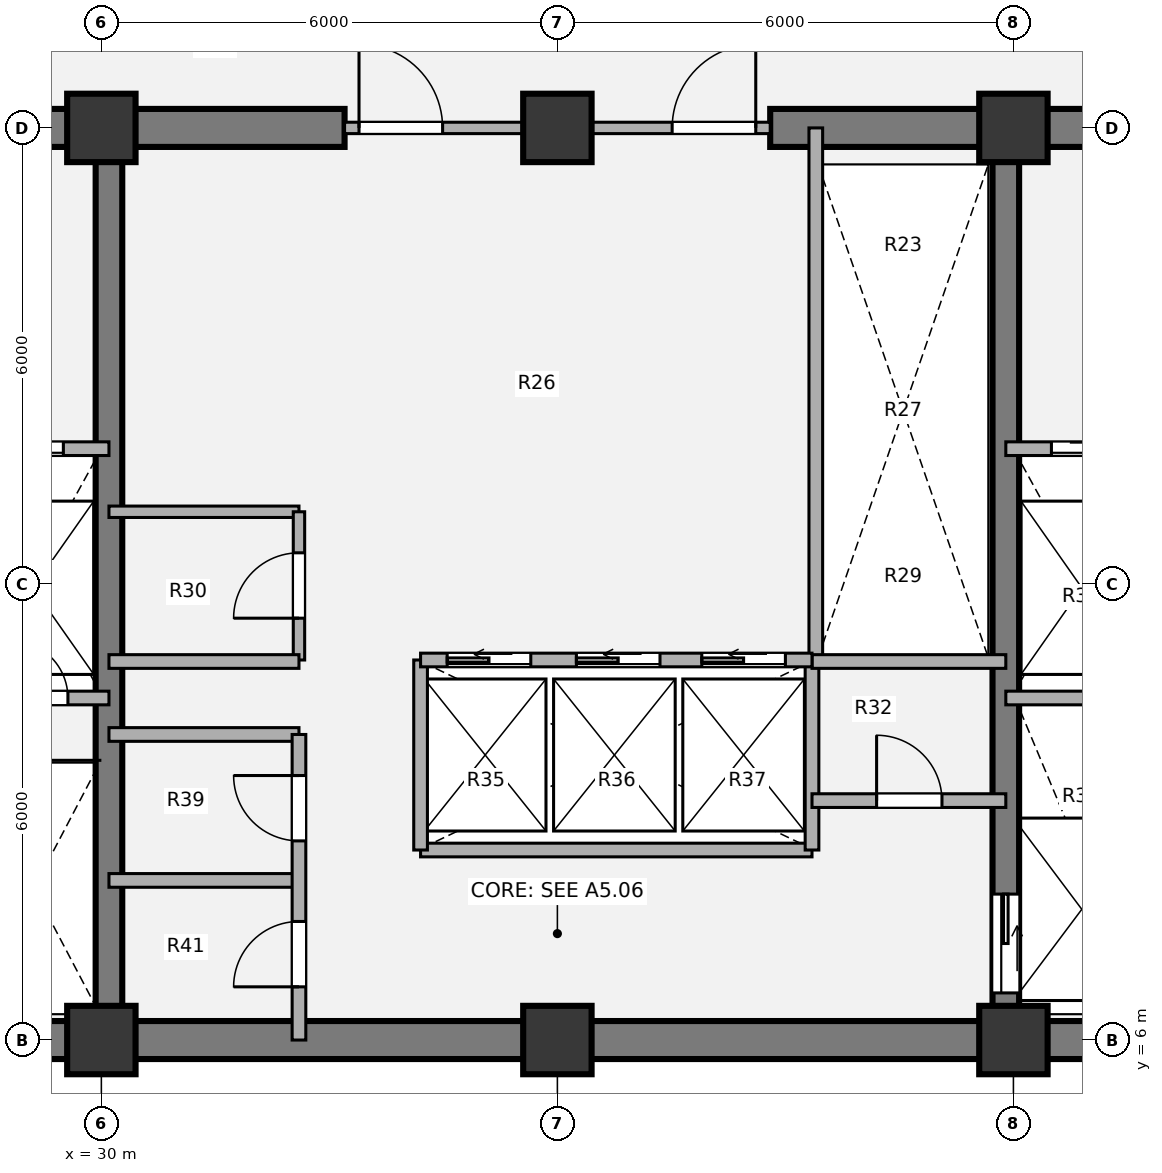
"""IFC4 building model, lengths in metres.
Left out: names, types, materials, properties, quantities, classifications, styles, units other than length and angle.
Written with IfcOpenShell. Run it as: python <this file> out.ifc"""

import sys

from ifc_helpers import new_model, si_unit, direction, frame, frame_2d, origin, origin_2d, place, context, subcontext, project, spatial, rectangle, extrude, source, transform, mapped, element, fill, save


model = new_model("IFC4")
c1 = context("Model", 3, precision=1e-05, world=origin(), true_north=direction((0.0, 1.0)))
c2 = subcontext(c1, "Body", "Model", "MODEL_VIEW")
j1 = project(units=[si_unit("LENGTHUNIT", "METRE"), si_unit("PLANEANGLEUNIT", "RADIAN")], contexts=[c1])
p1 = place(None, origin())
s1 = spatial("IfcSite", under=j1, at=p1, CompositionType="ELEMENT")
p2 = place(p1, origin())
s2 = spatial("IfcBuilding", under=s1, at=p2, CompositionType="ELEMENT")
p3 = place(p2, frame((0.0, 0.0, 93.6)))
s3 = spatial("IfcBuildingStorey", under=s2, at=p3, CompositionType="ELEMENT", Elevation=93.6)
m1 = source(origin(), c2, "Body", "SweptSolid", [
    extrude(rectangle(XDim=0.9, YDim=0.9, at=origin_2d()), origin(), (0.0, 0.0, 1.0), 3.78),
])
for number, where, z_axis, x_axis in (
    (1, (30.0, 6.0, 0.0), (0.0, 0.0, 1.0), (1.0, 0.0, 0.0)),
    (2, (36.0, 6.0, 0.0), (0.0, 0.0, 1.0), (1.0, 0.0, 0.0)),
    (3, (42.0, 6.0, 0.0), (0.0, 0.0, 1.0), (1.0, 0.0, 0.0)),
    (4, (30.0, 18.0, 0.0), (0.0, 0.0, 1.0), (1.0, 0.0, 0.0)),
    (5, (36.0, 18.0, 0.0), (0.0, 0.0, 1.0), (1.0, 0.0, 0.0)),
    (6, (42.0, 18.0, 0.0), (0.0, 0.0, 1.0), (1.0, 0.0, 0.0)),
):
    element("IfcColumn", number, at=place(p3, frame(where, z_axis=z_axis, x_axis=x_axis)), inside=s3, PredefinedType="COLUMN", context=c2, shape_type="MappedRepresentation", body=[
        mapped(m1, transform((0.0, 0.0, 0.0), x_axis=(1.0, 0.0, 0.0), y_axis=(0.0, 1.0, 0.0), z_axis=(0.0, 0.0, 1.0), scale=1.0)),
    ])
p4 = place(p3, frame((48.25, 6.0, 0.0), z_axis=(0.0, 0.0, 1.0), x_axis=(-1.0, 0.0, 0.0)))
e7 = element("IfcWall", 7, at=p4, inside=s3, PredefinedType="SHEAR", context=c2, shape_type="SweptSolid", body=[
    extrude(rectangle(XDim=24.5, YDim=0.5, at=frame_2d((12.25, 0.0))), origin(), (0.0, 0.0, 1.0), 3.78),
])
p5 = place(p3, frame((23.75, 18.0, 0.0), z_axis=(0.0, 0.0, 1.0), x_axis=(1.0, 0.0, 0.0)))
e8 = element("IfcWall", 8, at=p5, inside=s3, PredefinedType="SHEAR", context=c2, shape_type="SweptSolid", body=[
    extrude(rectangle(XDim=9.45, YDim=0.5, at=frame_2d((4.725, 0.0))), origin(), (0.0, 0.0, 1.0), 3.78),
])
p6 = place(p5, frame((2.95, 0.0, 0.0)))
e9 = element("IfcOpeningElement", 9, at=p6, cuts=e8, PredefinedType="OPENING", context=c2, shape_type="SweptSolid", body=[
    extrude(rectangle(XDim=1.1, YDim=2.1, at=origin_2d()), frame((0.55, 0.26, 1.05), z_axis=(0.0, -1.0, 0.0), x_axis=(1.0, 0.0, 0.0)), (0.0, 0.0, 1.0), 0.52),
])
p7 = place(p3, frame((38.8, 18.0, 0.0), z_axis=(0.0, 0.0, 1.0), x_axis=(1.0, 0.0, 0.0)))
e10 = element("IfcWall", 10, at=p7, inside=s3, PredefinedType="SHEAR", context=c2, shape_type="SweptSolid", body=[
    extrude(rectangle(XDim=9.45, YDim=0.5, at=frame_2d((4.725, 0.0))), origin(), (0.0, 0.0, 1.0), 3.78),
])
p8 = place(p7, frame((5.45, 0.0, 0.0)))
e11 = element("IfcOpeningElement", 11, at=p8, cuts=e10, PredefinedType="OPENING", context=c2, shape_type="SweptSolid", body=[
    extrude(rectangle(XDim=1.1, YDim=2.1, at=origin_2d()), frame((0.55, 0.26, 1.05), z_axis=(0.0, -1.0, 0.0), x_axis=(1.0, 0.0, 0.0)), (0.0, 0.0, 1.0), 0.52),
])
p9 = place(p3, frame((30.1, 6.0, 0.0), z_axis=(0.0, 0.0, 1.0), x_axis=(0.0, 1.0, 0.0)))
e12 = element("IfcWall", 12, at=p9, inside=s3, PredefinedType="SHEAR", context=c2, shape_type="SweptSolid", body=[
    extrude(rectangle(XDim=12.0, YDim=0.35, at=frame_2d((6.0, 0.0))), origin(), (0.0, 0.0, 1.0), 3.78),
])
p10 = place(p3, frame((41.9, 18.0, 0.0), z_axis=(0.0, 0.0, 1.0), x_axis=(0.0, -1.0, 0.0)))
e13 = element("IfcWall", 13, at=p10, inside=s3, PredefinedType="SHEAR", context=c2, shape_type="SweptSolid", body=[
    extrude(rectangle(XDim=12.0, YDim=0.35, at=frame_2d((6.0, 0.0))), origin(), (0.0, 0.0, 1.0), 3.78),
])
p11 = place(p10, frame((10.08, 0.0, 0.0)))
e14 = element("IfcOpeningElement", 14, at=p11, cuts=e13, PredefinedType="OPENING", context=c2, shape_type="SweptSolid", body=[
    extrude(rectangle(XDim=1.3, YDim=2.1, at=origin_2d()), frame((0.65, 0.185, 1.05), z_axis=(0.0, -1.0, 0.0), x_axis=(1.0, 0.0, 0.0)), (0.0, 0.0, 1.0), 0.37),
])
p12 = place(p3, frame((30.1, 12.95, 0.0), z_axis=(0.0, 0.0, 1.0), x_axis=(1.0, 0.0, 0.0)))
e15 = element("IfcWall", 15, at=p12, inside=s3, PredefinedType="PARTITIONING", context=c2, shape_type="SweptSolid", body=[
    extrude(rectangle(XDim=2.5, YDim=0.15, at=frame_2d((1.25, 0.0))), origin(), (0.0, 0.0, 1.0), 3.5),
])
p13 = place(p3, frame((32.6, 11.0, 0.0), z_axis=(0.0, 0.0, 1.0), x_axis=(0.0, 1.0, 0.0)))
e16 = element("IfcWall", 16, at=p13, inside=s3, PredefinedType="PARTITIONING", context=c2, shape_type="SweptSolid", body=[
    extrude(rectangle(XDim=1.95, YDim=0.15, at=frame_2d((0.975, 0.0))), origin(), (0.0, 0.0, 1.0), 3.5),
])
p14 = place(p13, frame((0.55, 0.0, 0.0)))
e17 = element("IfcOpeningElement", 17, at=p14, cuts=e16, PredefinedType="OPENING", context=c2, shape_type="SweptSolid", body=[
    extrude(rectangle(XDim=0.86, YDim=2.1, at=origin_2d()), frame((0.43, 0.085, 1.05), z_axis=(0.0, -1.0, 0.0), x_axis=(1.0, 0.0, 0.0)), (0.0, 0.0, 1.0), 0.17),
])
p15 = place(p3, frame((34.2, 8.5, 0.0), z_axis=(0.0, 0.0, 1.0), x_axis=(1.0, 0.0, 0.0)))
e18 = element("IfcWall", 18, at=p15, inside=s3, PredefinedType="PARTITIONING", context=c2, shape_type="SweptSolid", body=[
    extrude(rectangle(XDim=5.15, YDim=0.18, at=frame_2d((2.575, 0.0))), origin(), (0.0, 0.0, 1.0), 3.5),
])
for number, where, z_axis, x_axis in (
    (19, (34.2, 8.5, 0.0), (0.0, 0.0, 1.0), (0.0, 1.0, 0.0)),
    (20, (39.35, 8.5, 0.0), (0.0, 0.0, 1.0), (0.0, 1.0, 0.0)),
):
    element("IfcWall", number, at=place(p3, frame(where, z_axis=z_axis, x_axis=x_axis)), inside=s3, PredefinedType="PARTITIONING", context=c2, shape_type="SweptSolid", body=[
        extrude(rectangle(XDim=2.5, YDim=0.18, at=frame_2d((1.25, 0.0))), origin(), (0.0, 0.0, 1.0), 3.5),
    ])
p16 = place(p3, frame((39.4, 11.0, 0.0), z_axis=(0.0, 0.0, 1.0), x_axis=(0.0, 1.0, 0.0)))
e21 = element("IfcWall", 21, at=p16, inside=s3, PredefinedType="PARTITIONING", context=c2, shape_type="SweptSolid", body=[
    extrude(rectangle(XDim=7.0, YDim=0.18, at=frame_2d((3.5, 0.0))), origin(), (0.0, 0.0, 1.0), 3.5),
])
p17 = place(p3, frame((30.1, 10.98, 0.0), z_axis=(0.0, 0.0, 1.0), x_axis=(1.0, 0.0, 0.0)))
e22 = element("IfcWall", 22, at=p17, inside=s3, PredefinedType="PARTITIONING", context=c2, shape_type="SweptSolid", body=[
    extrude(rectangle(XDim=2.5, YDim=0.18, at=frame_2d((1.25, 0.0))), origin(), (0.0, 0.0, 1.0), 3.5),
])
p18 = place(p3, frame((39.35, 10.98, 0.0), z_axis=(0.0, 0.0, 1.0), x_axis=(1.0, 0.0, 0.0)))
e23 = element("IfcWall", 23, at=p18, inside=s3, PredefinedType="PARTITIONING", context=c2, shape_type="SweptSolid", body=[
    extrude(rectangle(XDim=2.55, YDim=0.18, at=frame_2d((1.275, 0.0))), origin(), (0.0, 0.0, 1.0), 3.5),
])
for number, where, z_axis, x_axis in (
    (24, (30.1, 8.1, 0.0), (0.0, 0.0, 1.0), (1.0, 0.0, 0.0)),
    (25, (30.1, 10.02, 0.0), (0.0, 0.0, 1.0), (1.0, 0.0, 0.0)),
):
    element("IfcWall", number, at=place(p3, frame(where, z_axis=z_axis, x_axis=x_axis)), inside=s3, PredefinedType="PARTITIONING", context=c2, shape_type="SweptSolid", body=[
        extrude(rectangle(XDim=2.5, YDim=0.18, at=frame_2d((1.25, 0.0))), origin(), (0.0, 0.0, 1.0), 3.5),
    ])
p19 = place(p3, frame((32.6, 6.0, 0.0), z_axis=(0.0, 0.0, 1.0), x_axis=(0.0, 1.0, 0.0)))
e26 = element("IfcWall", 26, at=p19, inside=s3, PredefinedType="PARTITIONING", context=c2, shape_type="SweptSolid", body=[
    extrude(rectangle(XDim=4.02, YDim=0.18, at=frame_2d((2.01, 0.0))), origin(), (0.0, 0.0, 1.0), 3.5),
])
p20 = place(p19, frame((0.7, 0.0, 0.0)))
e27 = element("IfcOpeningElement", 27, at=p20, cuts=e26, PredefinedType="OPENING", context=c2, shape_type="SweptSolid", body=[
    extrude(rectangle(XDim=0.86, YDim=2.1, at=origin_2d()), frame((0.43, 0.1, 1.05), z_axis=(0.0, -1.0, 0.0), x_axis=(1.0, 0.0, 0.0)), (0.0, 0.0, 1.0), 0.2),
])
p21 = place(p19, frame((2.62, 0.0, 0.0)))
e28 = element("IfcOpeningElement", 28, at=p21, cuts=e26, PredefinedType="OPENING", context=c2, shape_type="SweptSolid", body=[
    extrude(rectangle(XDim=0.86, YDim=2.1, at=origin_2d()), frame((0.43, 0.1, 1.05), z_axis=(0.0, -1.0, 0.0), x_axis=(1.0, 0.0, 0.0)), (0.0, 0.0, 1.0), 0.2),
])
p22 = place(p3, frame((39.35, 9.15, 0.0), z_axis=(0.0, 0.0, 1.0), x_axis=(1.0, 0.0, 0.0)))
e29 = element("IfcWall", 29, at=p22, inside=s3, PredefinedType="PARTITIONING", context=c2, shape_type="SweptSolid", body=[
    extrude(rectangle(XDim=2.55, YDim=0.18, at=frame_2d((1.275, 0.0))), origin(), (0.0, 0.0, 1.0), 3.5),
])
p23 = place(p22, frame((0.85, 0.0, 0.0)))
e30 = element("IfcOpeningElement", 30, at=p23, cuts=e29, PredefinedType="OPENING", context=c2, shape_type="SweptSolid", body=[
    extrude(rectangle(XDim=0.86, YDim=2.1, at=origin_2d()), frame((0.43, 0.1, 1.05), z_axis=(0.0, -1.0, 0.0), x_axis=(1.0, 0.0, 0.0)), (0.0, 0.0, 1.0), 0.2),
])
p24 = place(p3, frame((33.2, 18.0, 0.0), z_axis=(0.0, 0.0, 1.0), x_axis=(1.0, 0.0, 0.0)))
e31 = element("IfcWall", 31, at=p24, inside=s3, PredefinedType="PARTITIONING", context=c2, shape_type="SweptSolid", body=[
    extrude(rectangle(XDim=5.6, YDim=0.15, at=frame_2d((2.8, 0.0))), origin(), (0.0, 0.0, 1.0), 2.315),
])
p25 = place(p24, frame((0.19, 0.0, 0.0)))
e32 = element("IfcOpeningElement", 32, at=p25, cuts=e31, PredefinedType="OPENING", context=c2, shape_type="SweptSolid", body=[
    extrude(rectangle(XDim=1.1, YDim=2.1, at=origin_2d()), frame((0.55, 0.085, 1.05), z_axis=(0.0, -1.0, 0.0), x_axis=(1.0, 0.0, 0.0)), (0.0, 0.0, 1.0), 0.17),
])
p26 = place(p24, frame((4.31, 0.0, 0.0)))
e33 = element("IfcOpeningElement", 33, at=p26, cuts=e31, PredefinedType="OPENING", context=c2, shape_type="SweptSolid", body=[
    extrude(rectangle(XDim=1.1, YDim=2.1, at=origin_2d()), frame((0.55, 0.085, 1.05), z_axis=(0.0, -1.0, 0.0), x_axis=(1.0, 0.0, 0.0)), (0.0, 0.0, 1.0), 0.17),
])
p27 = place(p3, frame((24.0, 13.78, 0.0), z_axis=(0.0, 0.0, 1.0), x_axis=(1.0, 0.0, 0.0)))
e34 = element("IfcWall", 34, at=p27, inside=s3, PredefinedType="PARTITIONING", context=c2, shape_type="SweptSolid", body=[
    extrude(rectangle(XDim=6.1, YDim=0.18, at=frame_2d((3.05, 0.0))), origin(), (0.0, 0.0, 1.0), 3.5),
])
p28 = place(p27, frame((1.15, 0.0, 0.0)))
e35 = element("IfcOpeningElement", 35, at=p28, cuts=e34, PredefinedType="OPENING", context=c2, shape_type="SweptSolid", body=[
    extrude(rectangle(XDim=1.1, YDim=2.1, at=origin_2d()), frame((0.55, 0.1, 1.05), z_axis=(0.0, -1.0, 0.0), x_axis=(1.0, 0.0, 0.0)), (0.0, 0.0, 1.0), 0.2),
])
p29 = place(p27, frame((4.4, 0.0, 0.0)))
e36 = element("IfcOpeningElement", 36, at=p29, cuts=e34, PredefinedType="OPENING", context=c2, shape_type="SweptSolid", body=[
    extrude(rectangle(XDim=1.1, YDim=2.1, at=origin_2d()), frame((0.55, 0.1, 1.05), z_axis=(0.0, -1.0, 0.0), x_axis=(1.0, 0.0, 0.0)), (0.0, 0.0, 1.0), 0.2),
])
p30 = place(p3, frame((28.15, 10.5, 0.0), z_axis=(0.0, 0.0, 1.0), x_axis=(1.0, 0.0, 0.0)))
e37 = element("IfcWall", 37, at=p30, inside=s3, PredefinedType="PARTITIONING", context=c2, shape_type="SweptSolid", body=[
    extrude(rectangle(XDim=1.95, YDim=0.18, at=frame_2d((0.975, 0.0))), origin(), (0.0, 0.0, 1.0), 3.5),
])
p31 = place(p30, frame((0.65, 0.0, 0.0)))
e38 = element("IfcOpeningElement", 38, at=p31, cuts=e37, PredefinedType="OPENING", context=c2, shape_type="SweptSolid", body=[
    extrude(rectangle(XDim=0.76, YDim=2.05, at=origin_2d()), frame((0.38, 0.1, 1.025), z_axis=(0.0, -1.0, 0.0), x_axis=(1.0, 0.0, 0.0)), (0.0, 0.0, 1.0), 0.2),
])
p32 = place(p3, frame((41.9, 13.78, 0.0), z_axis=(0.0, 0.0, 1.0), x_axis=(1.0, 0.0, 0.0)))
e39 = element("IfcWall", 39, at=p32, inside=s3, PredefinedType="PARTITIONING", context=c2, shape_type="SweptSolid", body=[
    extrude(rectangle(XDim=6.1, YDim=0.18, at=frame_2d((3.05, 0.0))), origin(), (0.0, 0.0, 1.0), 3.5),
])
p33 = place(p32, frame((0.6, 0.0, 0.0)))
e40 = element("IfcOpeningElement", 40, at=p33, cuts=e39, PredefinedType="OPENING", context=c2, shape_type="SweptSolid", body=[
    extrude(rectangle(XDim=1.1, YDim=2.1, at=origin_2d()), frame((0.55, 0.1, 1.05), z_axis=(0.0, -1.0, 0.0), x_axis=(1.0, 0.0, 0.0)), (0.0, 0.0, 1.0), 0.2),
])
p34 = place(p32, frame((3.8, 0.0, 0.0)))
e41 = element("IfcOpeningElement", 41, at=p34, cuts=e39, PredefinedType="OPENING", context=c2, shape_type="SweptSolid", body=[
    extrude(rectangle(XDim=1.1, YDim=2.1, at=origin_2d()), frame((0.55, 0.1, 1.05), z_axis=(0.0, -1.0, 0.0), x_axis=(1.0, 0.0, 0.0)), (0.0, 0.0, 1.0), 0.2),
])
p35 = place(p3, frame((41.9, 10.5, 0.0), z_axis=(0.0, 0.0, 1.0), x_axis=(1.0, 0.0, 0.0)))
e42 = element("IfcWall", 42, at=p35, inside=s3, PredefinedType="PARTITIONING", context=c2, shape_type="SweptSolid", body=[
    extrude(rectangle(XDim=1.95, YDim=0.18, at=frame_2d((0.975, 0.0))), origin(), (0.0, 0.0, 1.0), 3.5),
])
p36 = place(p3, frame((34.2, 11.0, 0.0), z_axis=(0.0, 0.0, 1.0), x_axis=(1.0, 0.0, 0.0)))
e43 = element("IfcWall", 43, at=p36, inside=s3, PredefinedType="PARTITIONING", context=c2, shape_type="SweptSolid", body=[
    extrude(rectangle(XDim=5.15, YDim=0.18, at=frame_2d((2.575, 0.0))), origin(), (0.0, 0.0, 1.0), 3.5),
])
p37 = place(p36, frame((0.35, 0.0, 0.0)))
e44 = element("IfcOpeningElement", 44, at=p37, cuts=e43, PredefinedType="OPENING", context=c2, shape_type="SweptSolid", body=[
    extrude(rectangle(XDim=1.1, YDim=2.1, at=origin_2d()), frame((0.55, 0.1, 1.05), z_axis=(0.0, -1.0, 0.0), x_axis=(1.0, 0.0, 0.0)), (0.0, 0.0, 1.0), 0.2),
])
p38 = place(p36, frame((2.05, 0.0, 0.0)))
e45 = element("IfcOpeningElement", 45, at=p38, cuts=e43, PredefinedType="OPENING", context=c2, shape_type="SweptSolid", body=[
    extrude(rectangle(XDim=1.1, YDim=2.1, at=origin_2d()), frame((0.55, 0.1, 1.05), z_axis=(0.0, -1.0, 0.0), x_axis=(1.0, 0.0, 0.0)), (0.0, 0.0, 1.0), 0.2),
])
p39 = place(p36, frame((3.7, 0.0, 0.0)))
e46 = element("IfcOpeningElement", 46, at=p39, cuts=e43, PredefinedType="OPENING", context=c2, shape_type="SweptSolid", body=[
    extrude(rectangle(XDim=1.1, YDim=2.1, at=origin_2d()), frame((0.55, 0.1, 1.05), z_axis=(0.0, -1.0, 0.0), x_axis=(1.0, 0.0, 0.0)), (0.0, 0.0, 1.0), 0.2),
])
m2 = source(origin(), c2, "Body", "SweptSolid", [
    extrude(rectangle(XDim=0.86, YDim=2.1, at=origin_2d()), frame((0.43, 0.025, 1.05), z_axis=(0.0, -1.0, 0.0), x_axis=(1.0, 0.0, 0.0)), (0.0, 0.0, 1.0), 0.05),
])
p40 = place(p14, origin())
e47 = element("IfcDoor", 47, at=p40, inside=s3, OperationType="SINGLE_SWING_LEFT", PredefinedType="DOOR", context=c2, shape_type="MappedRepresentation", body=[
    mapped(m2, transform((0.0, 0.0, 0.0), x_axis=(1.0, 0.0, 0.0), y_axis=(0.0, 1.0, 0.0), z_axis=(0.0, 0.0, 1.0), scale=1.0)),
])
fill(e17, e47)
p41 = place(p20, origin())
e48 = element("IfcDoor", 48, at=p41, inside=s3, OperationType="SINGLE_SWING_LEFT", PredefinedType="DOOR", context=c2, shape_type="MappedRepresentation", body=[
    mapped(m2, transform((0.0, 0.0, 0.0), x_axis=(1.0, 0.0, 0.0), y_axis=(0.0, 1.0, 0.0), z_axis=(0.0, 0.0, 1.0), scale=1.0)),
])
fill(e27, e48)
p42 = place(p21, origin())
e49 = element("IfcDoor", 49, at=p42, inside=s3, OperationType="SINGLE_SWING_RIGHT", PredefinedType="DOOR", context=c2, shape_type="MappedRepresentation", body=[
    mapped(m2, transform((0.0, 0.0, 0.0), x_axis=(1.0, 0.0, 0.0), y_axis=(0.0, 1.0, 0.0), z_axis=(0.0, 0.0, 1.0), scale=1.0)),
])
fill(e28, e49)
p43 = place(p23, origin())
e50 = element("IfcDoor", 50, at=p43, inside=s3, OperationType="SINGLE_SWING_LEFT", PredefinedType="DOOR", context=c2, shape_type="MappedRepresentation", body=[
    mapped(m2, transform((0.0, 0.0, 0.0), x_axis=(1.0, 0.0, 0.0), y_axis=(0.0, 1.0, 0.0), z_axis=(0.0, 0.0, 1.0), scale=1.0)),
])
fill(e30, e50)
m3 = source(origin(), c2, "Body", "SweptSolid", [
    extrude(rectangle(XDim=1.1, YDim=2.1, at=origin_2d()), frame((0.55, 0.025, 1.05), z_axis=(0.0, -1.0, 0.0), x_axis=(1.0, 0.0, 0.0)), (0.0, 0.0, 1.0), 0.05),
])
p44 = place(p25, origin())
e51 = element("IfcDoor", 51, at=p44, inside=s3, OperationType="SINGLE_SWING_LEFT", PredefinedType="DOOR", context=c2, shape_type="MappedRepresentation", body=[
    mapped(m3, transform((0.0, 0.0, 0.0), x_axis=(1.0, 0.0, 0.0), y_axis=(0.0, 1.0, 0.0), z_axis=(0.0, 0.0, 1.0), scale=1.0)),
])
fill(e32, e51)
p45 = place(p26, origin())
e52 = element("IfcDoor", 52, at=p45, inside=s3, OperationType="SINGLE_SWING_RIGHT", PredefinedType="DOOR", context=c2, shape_type="MappedRepresentation", body=[
    mapped(m3, transform((0.0, 0.0, 0.0), x_axis=(1.0, 0.0, 0.0), y_axis=(0.0, 1.0, 0.0), z_axis=(0.0, 0.0, 1.0), scale=1.0)),
])
fill(e33, e52)
m4 = source(origin(), c2, "Body", "SweptSolid", [
    extrude(rectangle(XDim=1.1, YDim=2.1, at=origin_2d()), frame((0.55, 0.025, 1.05), z_axis=(0.0, -1.0, 0.0), x_axis=(1.0, 0.0, 0.0)), (0.0, 0.0, 1.0), 0.05),
])
p46 = place(p29, origin())
e53 = element("IfcDoor", 53, at=p46, inside=s3, OperationType="SLIDING_TO_LEFT", PredefinedType="DOOR", context=c2, shape_type="MappedRepresentation", body=[
    mapped(m4, transform((0.0, 0.0, 0.0), x_axis=(1.0, 0.0, 0.0), y_axis=(0.0, 1.0, 0.0), z_axis=(0.0, 0.0, 1.0), scale=1.0)),
])
fill(e36, e53)
m5 = source(origin(), c2, "Body", "SweptSolid", [
    extrude(rectangle(XDim=0.76, YDim=2.05, at=origin_2d()), frame((0.38, 0.025, 1.025), z_axis=(0.0, -1.0, 0.0), x_axis=(1.0, 0.0, 0.0)), (0.0, 0.0, 1.0), 0.05),
])
p47 = place(p31, origin())
e54 = element("IfcDoor", 54, at=p47, inside=s3, OperationType="SINGLE_SWING_LEFT", PredefinedType="DOOR", context=c2, shape_type="MappedRepresentation", body=[
    mapped(m5, transform((0.0, 0.0, 0.0), x_axis=(1.0, 0.0, 0.0), y_axis=(0.0, 1.0, 0.0), z_axis=(0.0, 0.0, 1.0), scale=1.0)),
])
fill(e38, e54)
p48 = place(p33, origin())
e55 = element("IfcDoor", 55, at=p48, inside=s3, OperationType="SLIDING_TO_RIGHT", PredefinedType="DOOR", context=c2, shape_type="MappedRepresentation", body=[
    mapped(m4, transform((0.0, 0.0, 0.0), x_axis=(1.0, 0.0, 0.0), y_axis=(0.0, 1.0, 0.0), z_axis=(0.0, 0.0, 1.0), scale=1.0)),
])
fill(e40, e55)
m6 = source(origin(), c2, "Body", "SweptSolid", [
    extrude(rectangle(XDim=1.3, YDim=2.1, at=origin_2d()), frame((0.65, 0.025, 1.05), z_axis=(0.0, -1.0, 0.0), x_axis=(1.0, 0.0, 0.0)), (0.0, 0.0, 1.0), 0.05),
])
p49 = place(p11, origin())
e56 = element("IfcDoor", 56, at=p49, inside=s3, OperationType="SLIDING_TO_LEFT", PredefinedType="DOOR", context=c2, shape_type="MappedRepresentation", body=[
    mapped(m6, transform((0.0, 0.0, 0.0), x_axis=(1.0, 0.0, 0.0), y_axis=(0.0, 1.0, 0.0), z_axis=(0.0, 0.0, 1.0), scale=1.0)),
])
fill(e14, e56)
p50 = place(p37, origin())
e57 = element("IfcDoor", 57, at=p50, inside=s3, OperationType="SLIDING_TO_LEFT", PredefinedType="DOOR", context=c2, shape_type="MappedRepresentation", body=[
    mapped(m4, transform((0.0, 0.0, 0.0), x_axis=(1.0, 0.0, 0.0), y_axis=(0.0, 1.0, 0.0), z_axis=(0.0, 0.0, 1.0), scale=1.0)),
])
fill(e44, e57)
p51 = place(p38, origin())
e58 = element("IfcDoor", 58, at=p51, inside=s3, OperationType="SLIDING_TO_LEFT", PredefinedType="DOOR", context=c2, shape_type="MappedRepresentation", body=[
    mapped(m4, transform((0.0, 0.0, 0.0), x_axis=(1.0, 0.0, 0.0), y_axis=(0.0, 1.0, 0.0), z_axis=(0.0, 0.0, 1.0), scale=1.0)),
])
fill(e45, e58)
p52 = place(p39, origin())
e59 = element("IfcDoor", 59, at=p52, inside=s3, OperationType="SLIDING_TO_LEFT", PredefinedType="DOOR", context=c2, shape_type="MappedRepresentation", body=[
    mapped(m4, transform((0.0, 0.0, 0.0), x_axis=(1.0, 0.0, 0.0), y_axis=(0.0, 1.0, 0.0), z_axis=(0.0, 0.0, 1.0), scale=1.0)),
])
fill(e46, e59)
save(model, sys.argv[1])
